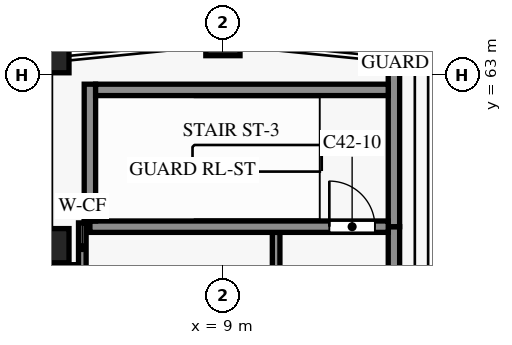
"""IFC4 building model, lengths in metres.
Left out: names, types, materials, properties, quantities, classifications, styles, units other than length and angle.
Written with IfcOpenShell. Run it as: python <this file> out.ifc"""

import sys

from ifc_helpers import new_model, si_unit, direction, frame, frame_2d, origin, origin_2d, place, context, subcontext, project, spatial, rectangle, extrude, element, fill, save


model = new_model("IFC4")
c1 = context("Model", 3, precision=1e-05, world=origin(), true_north=direction((0.0, 1.0)))
c2 = subcontext(c1, "Body", "Model", "MODEL_VIEW")
j1 = project(units=[si_unit("LENGTHUNIT", "METRE"), si_unit("PLANEANGLEUNIT", "RADIAN")], contexts=[c1])
p1 = place(None, origin())
s1 = spatial("IfcSite", under=j1, at=p1, CompositionType="ELEMENT")
p2 = place(p1, origin())
s2 = spatial("IfcBuilding", under=s1, at=p2, CompositionType="ELEMENT")
p3 = place(p2, frame((0.0, 0.0, 294.8)))
s3 = spatial("IfcBuildingStorey", under=s2, at=p3, CompositionType="ELEMENT", Elevation=294.8)
for number, where, z_axis, x_axis in (
    (1, (13.5, 63.45, 0.0), (0.0, 0.0, 1.0), (-0.995, 0.1, 0.0)),
    (2, (9.0, 63.9, 0.0), (0.0, 0.0, 1.0), (-1.0, 0.0, 0.0)),
    (3, (4.5, 63.45, 0.0), (0.0, 0.0, 1.0), (-0.995, -0.1, 0.0)),
):
    element("IfcColumn", number, at=place(p3, frame(where, z_axis=z_axis, x_axis=x_axis)), inside=s3, PredefinedType="COLUMN", context=c2, shape_type="SweptSolid", body=[
        extrude(rectangle(XDim=0.9, YDim=0.8, at=origin_2d()), origin(), (0.0, 0.0, 1.0), 4.0),
    ])
p4 = place(p3, frame((4.5, 58.5, 0.0), z_axis=(0.0, 0.0, 1.0), x_axis=(1.0, 0.0, 0.0)))
e4 = element("IfcColumn", 4, at=p4, inside=s3, PredefinedType="COLUMN", context=c2, shape_type="SweptSolid", body=[
    extrude(rectangle(XDim=0.9, YDim=0.9, at=origin_2d()), origin(), (0.0, 0.0, 1.0), 4.0),
])
p5 = place(p3, frame((5.5, 59.0, 0.0), z_axis=(0.0, 0.0, 1.0), x_axis=(1.0, 0.0, 0.0)))
e5 = element("IfcWall", 5, at=p5, inside=s3, PredefinedType="SHEAR", context=c2, shape_type="SweptSolid", body=[
    extrude(rectangle(XDim=7.85, YDim=0.3, at=frame_2d((3.925, 0.0))), origin(), (0.0, 0.0, 1.0), 3.7),
])
p6 = place(p5, frame((6.3, 0.0, 0.0)))
e6 = element("IfcOpeningElement", 6, at=p6, cuts=e5, PredefinedType="OPENING", context=c2, shape_type="SweptSolid", body=[
    extrude(rectangle(XDim=1.2, YDim=2.2, at=frame_2d((0.6, 1.1))), frame((0.0, 0.16, 0.0), z_axis=(0.0, -1.0, 0.0), x_axis=(1.0, 0.0, 0.0)), (0.0, 0.0, 1.0), 0.32),
])
p7 = place(p3, frame((5.65, 62.6, 0.0), z_axis=(0.0, 0.0, 1.0), x_axis=(1.0, 0.0, 0.0)))
e7 = element("IfcWall", 7, at=p7, inside=s3, PredefinedType="SHEAR", context=c2, shape_type="SweptSolid", body=[
    extrude(rectangle(XDim=7.7, YDim=0.3, at=frame_2d((3.85, 0.0))), origin(), (0.0, 0.0, 1.0), 3.7),
])
p8 = place(p3, frame((5.3, 57.8, 0.0), z_axis=(0.0, 0.0, 1.0), x_axis=(0.0, 1.0, 0.0)))
e8 = element("IfcWall", 8, at=p8, inside=s3, PredefinedType="PARTITIONING", context=c2, shape_type="SweptSolid", body=[
    extrude(rectangle(XDim=1.3, YDim=0.2, at=frame_2d((0.65, 0.0))), origin(), (0.0, 0.0, 1.0), 3.7),
])
p9 = place(p3, frame((5.5, 59.15, 0.0), z_axis=(0.0, 0.0, 1.0), x_axis=(0.0, 1.0, 0.0)))
e9 = element("IfcWall", 9, at=p9, inside=s3, PredefinedType="SHEAR", context=c2, shape_type="SweptSolid", body=[
    extrude(rectangle(XDim=3.6, YDim=0.3, at=frame_2d((1.8, 0.0))), origin(), (0.0, 0.0, 1.0), 3.7),
])
p10 = place(p3, frame((10.4, 54.9, 0.0), z_axis=(0.0, 0.0, 1.0), x_axis=(0.0, 1.0, 0.0)))
e10 = element("IfcWall", 10, at=p10, inside=s3, PredefinedType="PARTITIONING", context=c2, shape_type="SweptSolid", body=[
    extrude(rectangle(XDim=3.95, YDim=0.2, at=frame_2d((1.975, 0.0))), origin(), (0.0, 0.0, 1.0), 3.7),
])
p11 = place(p10, frame((1.5, 0.0, 0.0)))
e11 = element("IfcOpeningElement", 11, at=p11, cuts=e10, PredefinedType="OPENING", context=c2, shape_type="SweptSolid", body=[
    extrude(rectangle(XDim=1.2, YDim=2.2, at=frame_2d((0.6, 1.1))), frame((0.0, 0.11, 0.0), z_axis=(0.0, -1.0, 0.0), x_axis=(1.0, 0.0, 0.0)), (0.0, 0.0, 1.0), 0.22),
])
p12 = place(p3, frame((13.5, 39.925, 0.0), z_axis=(0.0, 0.0, 1.0), x_axis=(0.0, 1.0, 0.0)))
e12 = element("IfcWall", 12, at=p12, inside=s3, PredefinedType="SHEAR", context=c2, shape_type="SweptSolid", body=[
    extrude(rectangle(XDim=19.075, YDim=0.3, at=frame_2d((9.538, 0.0))), origin(), (0.0, 0.0, 1.0), 3.7),
])
p13 = place(p3, frame((13.5, 59.0, 0.0), z_axis=(0.0, 0.0, 1.0), x_axis=(0.0, 1.0, 0.0)))
e13 = element("IfcWall", 13, at=p13, inside=s3, PredefinedType="SHEAR", context=c2, shape_type="SweptSolid", body=[
    extrude(rectangle(XDim=4.048, YDim=0.3, at=frame_2d((2.024, 0.0))), origin(), (0.0, 0.0, 1.0), 3.7),
])
p14 = place(p6, origin())
e14 = element("IfcDoor", 14, at=p14, inside=s3, OperationType="SINGLE_SWING_RIGHT", PredefinedType="DOOR", context=c2, shape_type="SweptSolid", body=[
    extrude(rectangle(XDim=1.2, YDim=2.2, at=frame_2d((0.6, 1.1))), frame((0.0, 0.025, 0.0), z_axis=(0.0, -1.0, 0.0), x_axis=(1.0, 0.0, 0.0)), (0.0, 0.0, 1.0), 0.05),
])
fill(e6, e14)
save(model, sys.argv[1])
